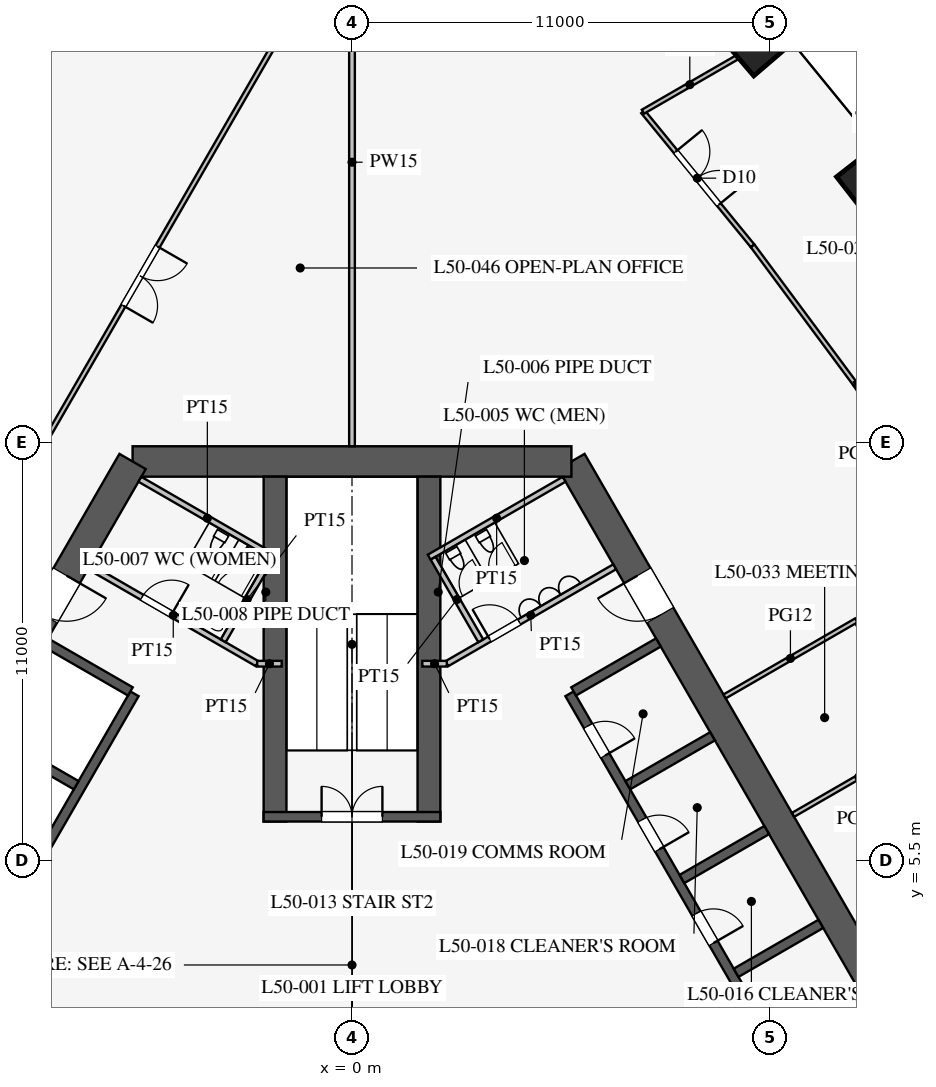
"""IFC4 building model, lengths in metres.
Left out: names, types, materials, properties, quantities, classifications, styles, units other than length and angle.
Written with IfcOpenShell. Run it as: python <this file> out.ifc"""

import sys

from ifc_helpers import new_model, si_unit, direction, frame, frame_2d, origin, origin_2d, place, context, subcontext, project, spatial, rectangle, extrude, element, fill, save


model = new_model("IFC4")
c1 = context("Model", 3, precision=1e-05, world=origin(), true_north=direction((0.0, 1.0)))
c2 = subcontext(c1, "Body", "Model", "MODEL_VIEW")
j1 = project(units=[si_unit("LENGTHUNIT", "METRE"), si_unit("PLANEANGLEUNIT", "RADIAN")], contexts=[c1])
p1 = place(None, origin())
s1 = spatial("IfcSite", under=j1, at=p1, CompositionType="ELEMENT")
p2 = place(p1, origin())
s2 = spatial("IfcBuilding", under=s1, at=p2, CompositionType="ELEMENT")
p3 = place(p2, frame((0.0, 0.0, 219.1)))
s3 = spatial("IfcBuildingStorey", under=s2, at=p3, CompositionType="ELEMENT", Elevation=219.1)
for number, where, z_axis, x_axis in (
    (1, (13.522, 23.396, 0.0), (0.0, 0.0, 1.0), (-0.615, 0.789, 0.0)),
    (2, (10.632, 26.923, 0.0), (0.0, 0.0, 1.0), (-0.651, 0.759, 0.0)),
):
    element("IfcColumn", number, at=place(p3, frame(where, z_axis=z_axis, x_axis=x_axis)), inside=s3, PredefinedType="COLUMN", context=c2, shape_type="SweptSolid", body=[
        extrude(rectangle(XDim=1.1, YDim=1.1, at=origin_2d()), origin(), (0.0, 0.0, 1.0), 4.2),
    ])
p4 = place(p3, frame((16.743, -3.0, 0.0), z_axis=(0.0, 0.0, 1.0), x_axis=(-0.500002442456, 0.866023993627, 0.0)))
e3 = element("IfcWall", 3, at=p4, inside=s3, PredefinedType="SHEAR", context=c2, shape_type="SweptSolid", body=[
    extrude(rectangle(XDim=21.939, YDim=0.8, at=frame_2d((10.97, 0.0))), origin(), (0.0, 0.0, 1.0), 4.2),
])
p5 = place(p4, frame((17.27, 0.0, 0.0)))
e4 = element("IfcOpeningElement", 4, at=p5, cuts=e3, PredefinedType="OPENING", context=c2, shape_type="SweptSolid", body=[
    extrude(rectangle(XDim=1.2, YDim=2.1, at=frame_2d((0.6, 1.05))), frame((0.0, 0.41, 0.0), z_axis=(0.0, -1.0, 0.0), x_axis=(1.0, 0.0, 0.0)), (0.0, 0.0, 1.0), 0.82),
])
p6 = place(p4, frame((3.47, 0.0, 0.0)))
e5 = element("IfcOpeningElement", 5, at=p6, cuts=e3, PredefinedType="OPENING", context=c2, shape_type="SweptSolid", body=[
    extrude(rectangle(XDim=1.2, YDim=2.1, at=frame_2d((0.6, 1.05))), frame((0.0, 0.41, 0.0), z_axis=(0.0, -1.0, 0.0), x_axis=(1.0, 0.0, 0.0)), (0.0, 0.0, 1.0), 0.82),
])
p7 = place(p3, frame((5.773, 16.0, 0.0), z_axis=(0.0, 0.0, 1.0), x_axis=(-1.0, 0.0, 0.0)))
e6 = element("IfcWall", 6, at=p7, inside=s3, PredefinedType="SHEAR", context=c2, shape_type="SweptSolid", body=[
    extrude(rectangle(XDim=11.547, YDim=0.8, at=frame_2d((5.773, 0.0))), origin(), (0.0, 0.0, 1.0), 4.2),
])
p8 = place(p3, frame((-5.773, 16.0, 0.0), z_axis=(0.0, 0.0, 1.0), x_axis=(-0.500002442456, -0.866023993627, 0.0)))
e7 = element("IfcWall", 7, at=p8, inside=s3, PredefinedType="SHEAR", context=c2, shape_type="SweptSolid", body=[
    extrude(rectangle(XDim=21.939, YDim=0.8, at=frame_2d((10.97, 0.0))), origin(), (0.0, 0.0, 1.0), 4.2),
])
p9 = place(p8, frame((17.27, 0.0, 0.0)))
e8 = element("IfcOpeningElement", 8, at=p9, cuts=e7, PredefinedType="OPENING", context=c2, shape_type="SweptSolid", body=[
    extrude(rectangle(XDim=1.2, YDim=2.1, at=frame_2d((0.6, 1.05))), frame((0.0, 0.41, 0.0), z_axis=(0.0, -1.0, 0.0), x_axis=(1.0, 0.0, 0.0)), (0.0, 0.0, 1.0), 0.82),
])
p10 = place(p8, frame((3.47, 0.0, 0.0)))
e9 = element("IfcOpeningElement", 9, at=p10, cuts=e7, PredefinedType="OPENING", context=c2, shape_type="SweptSolid", body=[
    extrude(rectangle(XDim=1.2, YDim=2.1, at=frame_2d((0.6, 1.05))), frame((0.0, 0.41, 0.0), z_axis=(0.0, -1.0, 0.0), x_axis=(1.0, 0.0, 0.0)), (0.0, 0.0, 1.0), 0.82),
])
p11 = place(p3, frame((11.424, 0.014, 0.0), z_axis=(0.0, 0.0, 1.0), x_axis=(-0.500001763848, 0.866024385424, 0.0)))
e10 = element("IfcWall", 10, at=p11, inside=s3, PredefinedType="SHEAR", context=c2, shape_type="SweptSolid", body=[
    extrude(rectangle(XDim=11.4, YDim=0.25, at=frame_2d((5.7, 0.0))), origin(), (0.0, 0.0, 1.0), 4.2),
])
p12 = place(p11, frame((0.975, 0.0, 0.0)))
e11 = element("IfcOpeningElement", 11, at=p12, cuts=e10, PredefinedType="OPENING", context=c2, shape_type="SweptSolid", body=[
    extrude(rectangle(XDim=0.9, YDim=2.1, at=frame_2d((0.45, 1.05))), frame((0.0, 0.135, 0.0), z_axis=(0.0, -1.0, 0.0), x_axis=(1.0, 0.0, 0.0)), (0.0, 0.0, 1.0), 0.27),
])
p13 = place(p11, frame((3.825, 0.0, 0.0)))
e12 = element("IfcOpeningElement", 12, at=p13, cuts=e10, PredefinedType="OPENING", context=c2, shape_type="SweptSolid", body=[
    extrude(rectangle(XDim=0.9, YDim=2.1, at=frame_2d((0.45, 1.05))), frame((0.0, 0.135, 0.0), z_axis=(0.0, -1.0, 0.0), x_axis=(1.0, 0.0, 0.0)), (0.0, 0.0, 1.0), 0.27),
])
p14 = place(p11, frame((6.675, 0.0, 0.0)))
e13 = element("IfcOpeningElement", 13, at=p14, cuts=e10, PredefinedType="OPENING", context=c2, shape_type="SweptSolid", body=[
    extrude(rectangle(XDim=0.9, YDim=2.1, at=frame_2d((0.45, 1.05))), frame((0.0, 0.135, 0.0), z_axis=(0.0, -1.0, 0.0), x_axis=(1.0, 0.0, 0.0)), (0.0, 0.0, 1.0), 0.27),
])
p15 = place(p11, frame((9.525, 0.0, 0.0)))
e14 = element("IfcOpeningElement", 14, at=p15, cuts=e10, PredefinedType="OPENING", context=c2, shape_type="SweptSolid", body=[
    extrude(rectangle(XDim=0.9, YDim=2.1, at=frame_2d((0.45, 1.05))), frame((0.0, 0.135, 0.0), z_axis=(0.0, -1.0, 0.0), x_axis=(1.0, 0.0, 0.0)), (0.0, 0.0, 1.0), 0.27),
])
for number, where, z_axis, x_axis in (
    (15, (10.107, 2.544, 0.0), (0.0, 0.0, 1.0), (0.866, 0.5, 0.0)),
    (16, (8.682, 5.012, 0.0), (0.0, 0.0, 1.0), (0.866, 0.5, 0.0)),
    (17, (7.257, 7.481, 0.0), (0.0, 0.0, 1.0), (0.866, 0.5, 0.0)),
):
    element("IfcWall", number, at=place(p3, frame(where, z_axis=z_axis, x_axis=x_axis)), inside=s3, PredefinedType="SHEAR", context=c2, shape_type="SweptSolid", body=[
        extrude(rectangle(XDim=2.575, YDim=0.25, at=frame_2d((1.288, 0.0))), origin(), (0.0, 0.0, 1.0), 4.2),
    ])
p16 = place(p3, frame((5.832, 9.949, 0.0), z_axis=(0.0, 0.0, 1.0), x_axis=(0.866029291668, 0.499993265928, 0.0)))
e18 = element("IfcWall", 18, at=p16, inside=s3, PredefinedType="SHEAR", context=c2, shape_type="SweptSolid", body=[
    extrude(rectangle(XDim=2.575, YDim=0.25, at=frame_2d((1.288, 0.0))), origin(), (0.0, 0.0, 1.0), 4.2),
])
p17 = place(p3, frame((-5.724, 9.886, 0.0), z_axis=(0.0, 0.0, 1.0), x_axis=(-0.500001763848, -0.866024385424, 0.0)))
e19 = element("IfcWall", 19, at=p17, inside=s3, PredefinedType="SHEAR", context=c2, shape_type="SweptSolid", body=[
    extrude(rectangle(XDim=11.4, YDim=0.25, at=frame_2d((5.7, 0.0))), origin(), (0.0, 0.0, 1.0), 4.2),
])
p18 = place(p17, frame((6.525, 0.0, 0.0)))
e20 = element("IfcOpeningElement", 20, at=p18, cuts=e19, PredefinedType="OPENING", context=c2, shape_type="SweptSolid", body=[
    extrude(rectangle(XDim=1.2, YDim=2.2, at=frame_2d((0.6, 1.1))), frame((0.0, 0.135, 0.0), z_axis=(0.0, -1.0, 0.0), x_axis=(1.0, 0.0, 0.0)), (0.0, 0.0, 1.0), 0.27),
])
p19 = place(p17, frame((9.375, 0.0, 0.0)))
e21 = element("IfcOpeningElement", 21, at=p19, cuts=e19, PredefinedType="OPENING", context=c2, shape_type="SweptSolid", body=[
    extrude(rectangle(XDim=1.2, YDim=2.2, at=frame_2d((0.6, 1.1))), frame((0.0, 0.135, 0.0), z_axis=(0.0, -1.0, 0.0), x_axis=(1.0, 0.0, 0.0)), (0.0, 0.0, 1.0), 0.27),
])
p20 = place(p3, frame((-5.832, 9.949, 0.0), z_axis=(0.0, 0.0, 1.0), x_axis=(-0.866029291668, 0.499993265928, 0.0)))
e22 = element("IfcWall", 22, at=p20, inside=s3, PredefinedType="SHEAR", context=c2, shape_type="SweptSolid", body=[
    extrude(rectangle(XDim=2.575, YDim=0.25, at=frame_2d((1.288, 0.0))), origin(), (0.0, 0.0, 1.0), 4.2),
])
p21 = place(p3, frame((-7.257, 7.481, 0.0), z_axis=(0.0, 0.0, 1.0), x_axis=(-0.866046643894, 0.499963209246, 0.0)))
e23 = element("IfcWall", 23, at=p21, inside=s3, PredefinedType="SHEAR", context=c2, shape_type="SweptSolid", body=[
    extrude(rectangle(XDim=2.575, YDim=0.25, at=frame_2d((1.288, 0.0))), origin(), (0.0, 0.0, 1.0), 4.2),
])
for number, where, z_axis, x_axis in (
    (24, (2.025, 6.525, 0.0), (0.0, 0.0, 1.0), (0.0, 1.0, 0.0)),
    (25, (-2.025, 6.525, 0.0), (0.0, 0.0, 1.0), (0.0, 1.0, 0.0)),
):
    element("IfcWall", number, at=place(p3, frame(where, z_axis=z_axis, x_axis=x_axis)), inside=s3, PredefinedType="SHEAR", context=c2, shape_type="SweptSolid", body=[
        extrude(rectangle(XDim=9.075, YDim=0.6, at=frame_2d((4.538, 0.0))), origin(), (0.0, 0.0, 1.0), 4.2),
    ])
p22 = place(p3, frame((2.325, 6.65, 0.0), z_axis=(0.0, 0.0, 1.0), x_axis=(-1.0, 0.0, 0.0)))
e26 = element("IfcWall", 26, at=p22, inside=s3, PredefinedType="SHEAR", context=c2, shape_type="SweptSolid", body=[
    extrude(rectangle(XDim=4.65, YDim=0.25, at=frame_2d((2.325, 0.0))), origin(), (0.0, 0.0, 1.0), 4.2),
])
p23 = place(p22, frame((1.525, 0.0, 0.0)))
e27 = element("IfcOpeningElement", 27, at=p23, cuts=e26, PredefinedType="OPENING", context=c2, shape_type="SweptSolid", body=[
    extrude(rectangle(XDim=1.6, YDim=2.1, at=frame_2d((0.8, 1.05))), frame((0.0, 0.135, 0.0), z_axis=(0.0, -1.0, 0.0), x_axis=(1.0, 0.0, 0.0)), (0.0, 0.0, 1.0), 0.27),
])
p24 = place(p3, frame((2.495, 10.678, 0.0), z_axis=(0.0, 0.0, 1.0), x_axis=(0.86602216432, 0.500005610874, 0.0)))
e28 = element("IfcWall", 28, at=p24, inside=s3, PredefinedType="PARTITIONING", context=c2, shape_type="SweptSolid", body=[
    extrude(rectangle(XDim=5.1, YDim=0.15, at=frame_2d((2.55, 0.0))), origin(), (0.0, 0.0, 1.0), 4.0),
])
p25 = place(p24, frame((1.3, 0.0, 0.0)))
e29 = element("IfcOpeningElement", 29, at=p25, cuts=e28, PredefinedType="OPENING", context=c2, shape_type="SweptSolid", body=[
    extrude(rectangle(XDim=0.9, YDim=2.1, at=frame_2d((0.45, 1.05))), frame((0.0, 0.085, 0.0), z_axis=(0.0, -1.0, 0.0), x_axis=(1.0, 0.0, 0.0)), (0.0, 0.0, 1.0), 0.17),
])
p26 = place(p3, frame((-2.495, 10.678, 0.0), z_axis=(0.0, 0.0, 1.0), x_axis=(-0.86602216432, 0.500005610874, 0.0)))
e30 = element("IfcWall", 30, at=p26, inside=s3, PredefinedType="PARTITIONING", context=c2, shape_type="SweptSolid", body=[
    extrude(rectangle(XDim=5.1, YDim=0.15, at=frame_2d((2.55, 0.0))), origin(), (0.0, 0.0, 1.0), 4.0),
])
p27 = place(p26, frame((2.6, 0.0, 0.0)))
e31 = element("IfcOpeningElement", 31, at=p27, cuts=e30, PredefinedType="OPENING", context=c2, shape_type="SweptSolid", body=[
    extrude(rectangle(XDim=0.9, YDim=2.1, at=frame_2d((0.45, 1.05))), frame((0.0, 0.085, 0.0), z_axis=(0.0, -1.0, 0.0), x_axis=(1.0, 0.0, 0.0)), (0.0, 0.0, 1.0), 0.17),
])
for number, where, z_axis, x_axis in (
    (32, (2.495, 10.678, 0.0), (0.0, 0.0, 1.0), (-1.0, 0.0, 0.0)),
    (33, (-2.495, 10.678, 0.0), (0.0, 0.0, 1.0), (1.0, 0.0, 0.0)),
):
    element("IfcWall", number, at=place(p3, frame(where, z_axis=z_axis, x_axis=x_axis)), inside=s3, PredefinedType="PARTITIONING", context=c2, shape_type="SweptSolid", body=[
        extrude(rectangle(XDim=0.645, YDim=0.15, at=frame_2d((0.323, 0.0))), origin(), (0.0, 0.0, 1.0), 4.0),
    ])
p28 = place(p3, frame((2.031, 13.482, 0.0), z_axis=(0.0, 0.0, 1.0), x_axis=(0.866050731258, 0.499956128963, 0.0)))
e34 = element("IfcWall", 34, at=p28, inside=s3, PredefinedType="PARTITIONING", context=c2, shape_type="SweptSolid", body=[
    extrude(rectangle(XDim=4.1, YDim=0.15, at=frame_2d((2.05, 0.0))), origin(), (0.0, 0.0, 1.0), 4.0),
])
p29 = place(p3, frame((3.389, 11.281, 0.0), z_axis=(0.0, 0.0, 1.0), x_axis=(-0.499989096993, 0.866031698547, 0.0)))
e35 = element("IfcWall", 35, at=p29, inside=s3, PredefinedType="PARTITIONING", context=c2, shape_type="SweptSolid", body=[
    extrude(rectangle(XDim=2.51, YDim=0.15, at=frame_2d((1.255, 0.0))), origin(), (0.0, 0.0, 1.0), 4.0),
])
p30 = place(p3, frame((-2.031, 13.482, 0.0), z_axis=(0.0, 0.0, 1.0), x_axis=(-0.866050731258, 0.499956128963, 0.0)))
e36 = element("IfcWall", 36, at=p30, inside=s3, PredefinedType="PARTITIONING", context=c2, shape_type="SweptSolid", body=[
    extrude(rectangle(XDim=4.1, YDim=0.15, at=frame_2d((2.05, 0.0))), origin(), (0.0, 0.0, 1.0), 4.0),
])
p31 = place(p3, frame((-3.389, 11.281, 0.0), z_axis=(0.0, 0.0, 1.0), x_axis=(0.499989096993, 0.866031698547, 0.0)))
e37 = element("IfcWall", 37, at=p31, inside=s3, PredefinedType="PARTITIONING", context=c2, shape_type="SweptSolid", body=[
    extrude(rectangle(XDim=2.51, YDim=0.15, at=frame_2d((1.255, 0.0))), origin(), (0.0, 0.0, 1.0), 4.0),
])
p32 = place(p3, frame((0.0, 16.4, 0.0), z_axis=(0.0, 0.0, 1.0), x_axis=(0.0, 1.0, 0.0)))
e38 = element("IfcWall", 38, at=p32, inside=s3, PredefinedType="PARTITIONING", context=c2, shape_type="SweptSolid", body=[
    extrude(rectangle(XDim=14.95, YDim=0.15, at=frame_2d((7.475, 0.0))), origin(), (0.0, 0.0, 1.0), 2.4),
])
p33 = place(p3, frame((15.069, 8.7, 0.0), z_axis=(0.0, 0.0, 1.0), x_axis=(-0.500012057535, 0.866018442252, 0.0)))
e39 = element("IfcWall", 39, at=p33, inside=s3, PredefinedType="PARTITIONING", context=c2, shape_type="SweptSolid", body=[
    extrude(rectangle(XDim=3.6, YDim=0.12, at=frame_2d((1.8, 0.0))), origin(), (0.0, 0.0, 1.0), 2.9),
])
p34 = place(p33, frame((1.3, 0.0, 0.15)))
e40 = element("IfcOpeningElement", 40, at=p34, cuts=e39, PredefinedType="OPENING", context=c2, shape_type="SweptSolid", body=[
    extrude(rectangle(XDim=1.0, YDim=2.1, at=frame_2d((0.5, 1.05))), frame((0.0, 0.07, 0.0), z_axis=(0.0, -1.0, 0.0), x_axis=(1.0, 0.0, 0.0)), (0.0, 0.0, 1.0), 0.14),
])
for number, where, z_axis, x_axis in (
    (41, (9.805, 9.818, 0.0), (0.0, 0.0, 1.0), (0.866, 0.5, 0.0)),
    (42, (11.605, 6.7, 0.0), (0.0, 0.0, 1.0), (0.866, 0.5, 0.0)),
):
    element("IfcWall", number, at=place(p3, frame(where, z_axis=z_axis, x_axis=x_axis)), inside=s3, PredefinedType="PARTITIONING", context=c2, shape_type="SweptSolid", body=[
        extrude(rectangle(XDim=4.0, YDim=0.12, at=frame_2d((2.0, 0.0))), origin(), (0.0, 0.0, 1.0), 2.9),
    ])
p35 = place(p3, frame((10.541, 21.674, 0.0), z_axis=(0.0, 0.0, 1.0), x_axis=(-0.632733183181, 0.774369885069, 0.0)))
e43 = element("IfcWall", 43, at=p35, inside=s3, PredefinedType="PARTITIONING", context=c2, shape_type="SweptSolid", body=[
    extrude(rectangle(XDim=4.559, YDim=0.12, at=frame_2d((2.28, 0.0))), origin(), (0.0, 0.0, 1.0), 2.9),
])
p36 = place(p35, frame((1.4, 0.0, 0.15)))
e44 = element("IfcOpeningElement", 44, at=p36, cuts=e43, PredefinedType="OPENING", context=c2, shape_type="SweptSolid", body=[
    extrude(rectangle(XDim=1.8, YDim=2.1, at=frame_2d((0.9, 1.05))), frame((0.0, 0.07, 0.0), z_axis=(0.0, -1.0, 0.0), x_axis=(1.0, 0.0, 0.0)), (0.0, 0.0, 1.0), 0.14),
])
p37 = place(p3, frame((15.761, 14.296, 0.0), z_axis=(0.0, 0.0, 1.0), x_axis=(-0.55850386778, 0.829501916619, 0.0)))
e45 = element("IfcWall", 45, at=p37, inside=s3, PredefinedType="PARTITIONING", context=c2, shape_type="SweptSolid", body=[
    extrude(rectangle(XDim=4.511, YDim=0.12, at=frame_2d((2.255, 0.0))), origin(), (0.0, 0.0, 1.0), 2.9),
])
p38 = place(p37, frame((1.8, 0.0, 0.15)))
e46 = element("IfcOpeningElement", 46, at=p38, cuts=e45, PredefinedType="OPENING", context=c2, shape_type="SweptSolid", body=[
    extrude(rectangle(XDim=0.9, YDim=2.1, at=frame_2d((0.45, 1.05))), frame((0.0, 0.07, 0.0), z_axis=(0.0, -1.0, 0.0), x_axis=(1.0, 0.0, 0.0)), (0.0, 0.0, 1.0), 0.14),
])
p39 = place(p3, frame((13.242, 18.037, 0.0), z_axis=(0.0, 0.0, 1.0), x_axis=(-0.596173167565, 0.802855873912, 0.0)))
e47 = element("IfcWall", 47, at=p39, inside=s3, PredefinedType="PARTITIONING", context=c2, shape_type="SweptSolid", body=[
    extrude(rectangle(XDim=4.53, YDim=0.12, at=frame_2d((2.265, 0.0))), origin(), (0.0, 0.0, 1.0), 2.9),
])
p40 = place(p3, frame((7.656, 25.205, 0.0), z_axis=(0.0, 0.0, 1.0), x_axis=(0.866022741256, 0.500004611607, 0.0)))
e48 = element("IfcWall", 48, at=p40, inside=s3, PredefinedType="PARTITIONING", context=c2, shape_type="SweptSolid", body=[
    extrude(rectangle(XDim=2.846, YDim=0.12, at=frame_2d((1.423, 0.0))), origin(), (0.0, 0.0, 1.0), 2.9),
])
p41 = place(p3, frame((13.242, 18.037, 0.0), z_axis=(0.0, 0.0, 1.0), x_axis=(0.866020927947, 0.500007752297, 0.0)))
e49 = element("IfcWall", 49, at=p41, inside=s3, PredefinedType="PARTITIONING", context=c2, shape_type="SweptSolid", body=[
    extrude(rectangle(XDim=2.864, YDim=0.12, at=frame_2d((1.432, 0.0))), origin(), (0.0, 0.0, 1.0), 2.9),
])
p42 = place(p3, frame((-0.016, 30.491, 0.0), z_axis=(0.0, 0.0, 1.0), x_axis=(-0.50000091641, -0.866024874695, 0.0)))
e50 = element("IfcWall", 50, at=p42, inside=s3, PredefinedType="PARTITIONING", context=c2, shape_type="SweptSolid", body=[
    extrude(rectangle(XDim=52.796, YDim=0.12, at=frame_2d((26.398, 0.0))), origin(), (0.0, 0.0, 1.0), 2.9),
])
p43 = place(p42, frame((10.2, 0.0, 0.15)))
e51 = element("IfcOpeningElement", 51, at=p43, cuts=e50, PredefinedType="OPENING", context=c2, shape_type="SweptSolid", body=[
    extrude(rectangle(XDim=1.8, YDim=2.1, at=frame_2d((0.9, 1.05))), frame((0.0, 0.07, 0.0), z_axis=(0.0, -1.0, 0.0), x_axis=(1.0, 0.0, 0.0)), (0.0, 0.0, 1.0), 0.14),
])
p44 = place(p42, frame((40.8, 0.0, 0.15)))
e52 = element("IfcOpeningElement", 52, at=p44, cuts=e50, PredefinedType="OPENING", context=c2, shape_type="SweptSolid", body=[
    extrude(rectangle(XDim=1.8, YDim=2.1, at=frame_2d((0.9, 1.05))), frame((0.0, 0.07, 0.0), z_axis=(0.0, -1.0, 0.0), x_axis=(1.0, 0.0, 0.0)), (0.0, 0.0, 1.0), 0.14),
])
p45 = place(p25, origin())
e53 = element("IfcDoor", 53, at=p45, inside=s3, OperationType="SINGLE_SWING_LEFT", PredefinedType="DOOR", context=c2, shape_type="SweptSolid", body=[
    extrude(rectangle(XDim=0.9, YDim=2.1, at=frame_2d((0.45, 1.05))), frame((0.0, 0.025, 0.0), z_axis=(0.0, -1.0, 0.0), x_axis=(1.0, 0.0, 0.0)), (0.0, 0.0, 1.0), 0.05),
])
fill(e29, e53)
p46 = place(p27, frame((0.9, 0.0, 0.0), z_axis=(0.0, 0.0, 1.0), x_axis=(-1.0, 0.0, 0.0)))
e54 = element("IfcDoor", 54, at=p46, inside=s3, OperationType="SINGLE_SWING_RIGHT", PredefinedType="DOOR", context=c2, shape_type="SweptSolid", body=[
    extrude(rectangle(XDim=0.9, YDim=2.1, at=frame_2d((0.45, 1.05))), frame((0.0, 0.025, 0.0), z_axis=(0.0, -1.0, 0.0), x_axis=(1.0, 0.0, 0.0)), (0.0, 0.0, 1.0), 0.05),
])
fill(e31, e54)
p47 = place(p23, frame((1.6, 0.0, 0.0), z_axis=(0.0, 0.0, 1.0), x_axis=(-1.0, 0.0, 0.0)))
e55 = element("IfcDoor", 55, at=p47, inside=s3, OperationType="DOUBLE_DOOR_SINGLE_SWING", PredefinedType="DOOR", context=c2, shape_type="SweptSolid", body=[
    extrude(rectangle(XDim=1.6, YDim=2.1, at=frame_2d((0.8, 1.05))), frame((0.0, 0.025, 0.0), z_axis=(0.0, -1.0, 0.0), x_axis=(1.0, 0.0, 0.0)), (0.0, 0.0, 1.0), 0.05),
])
fill(e27, e55)
p48 = place(p5, origin())
e56 = element("IfcDoor", 56, at=p48, inside=s3, OperationType="SINGLE_SWING_RIGHT", PredefinedType="DOOR", context=c2, shape_type="SweptSolid", body=[
    extrude(rectangle(XDim=1.2, YDim=2.1, at=frame_2d((0.6, 1.05))), frame((0.0, 0.025, 0.0), z_axis=(0.0, -1.0, 0.0), x_axis=(1.0, 0.0, 0.0)), (0.0, 0.0, 1.0), 0.05),
])
fill(e4, e56)
p49 = place(p10, origin())
e57 = element("IfcDoor", 57, at=p49, inside=s3, OperationType="SINGLE_SWING_LEFT", PredefinedType="DOOR", context=c2, shape_type="SweptSolid", body=[
    extrude(rectangle(XDim=1.2, YDim=2.1, at=frame_2d((0.6, 1.05))), frame((0.0, 0.025, 0.0), z_axis=(0.0, -1.0, 0.0), x_axis=(1.0, 0.0, 0.0)), (0.0, 0.0, 1.0), 0.05),
])
fill(e9, e57)
p50 = place(p13, frame((0.9, 0.0, 0.0), z_axis=(0.0, 0.0, 1.0), x_axis=(-1.0, 0.0, 0.0)))
e58 = element("IfcDoor", 58, at=p50, inside=s3, OperationType="SINGLE_SWING_RIGHT", PredefinedType="DOOR", context=c2, shape_type="SweptSolid", body=[
    extrude(rectangle(XDim=0.9, YDim=2.1, at=frame_2d((0.45, 1.05))), frame((0.0, 0.025, 0.0), z_axis=(0.0, -1.0, 0.0), x_axis=(1.0, 0.0, 0.0)), (0.0, 0.0, 1.0), 0.05),
])
fill(e12, e58)
p51 = place(p14, frame((0.9, 0.0, 0.0), z_axis=(0.0, 0.0, 1.0), x_axis=(-1.0, 0.0, 0.0)))
e59 = element("IfcDoor", 59, at=p51, inside=s3, OperationType="SINGLE_SWING_RIGHT", PredefinedType="DOOR", context=c2, shape_type="SweptSolid", body=[
    extrude(rectangle(XDim=0.9, YDim=2.1, at=frame_2d((0.45, 1.05))), frame((0.0, 0.025, 0.0), z_axis=(0.0, -1.0, 0.0), x_axis=(1.0, 0.0, 0.0)), (0.0, 0.0, 1.0), 0.05),
])
fill(e13, e59)
p52 = place(p15, frame((0.9, 0.0, 0.0), z_axis=(0.0, 0.0, 1.0), x_axis=(-1.0, 0.0, 0.0)))
e60 = element("IfcDoor", 60, at=p52, inside=s3, OperationType="SINGLE_SWING_RIGHT", PredefinedType="DOOR", context=c2, shape_type="SweptSolid", body=[
    extrude(rectangle(XDim=0.9, YDim=2.1, at=frame_2d((0.45, 1.05))), frame((0.0, 0.025, 0.0), z_axis=(0.0, -1.0, 0.0), x_axis=(1.0, 0.0, 0.0)), (0.0, 0.0, 1.0), 0.05),
])
fill(e14, e60)
p53 = place(p36, frame((1.8, 0.0, 0.0), z_axis=(0.0, 0.0, 1.0), x_axis=(-1.0, 0.0, 0.0)))
e61 = element("IfcDoor", 61, at=p53, inside=s3, OperationType="DOUBLE_DOOR_SINGLE_SWING", PredefinedType="DOOR", context=c2, shape_type="SweptSolid", body=[
    extrude(rectangle(XDim=1.8, YDim=2.1, at=frame_2d((0.9, 1.05))), frame((0.0, 0.025, 0.0), z_axis=(0.0, -1.0, 0.0), x_axis=(1.0, 0.0, 0.0)), (0.0, 0.0, 1.0), 0.05),
])
fill(e44, e61)
p54 = place(p43, origin())
e62 = element("IfcDoor", 62, at=p54, inside=s3, OperationType="DOUBLE_DOOR_SINGLE_SWING", PredefinedType="DOOR", context=c2, shape_type="SweptSolid", body=[
    extrude(rectangle(XDim=1.8, YDim=2.1, at=frame_2d((0.9, 1.05))), frame((0.0, 0.025, 0.0), z_axis=(0.0, -1.0, 0.0), x_axis=(1.0, 0.0, 0.0)), (0.0, 0.0, 1.0), 0.05),
])
fill(e51, e62)
save(model, sys.argv[1])
